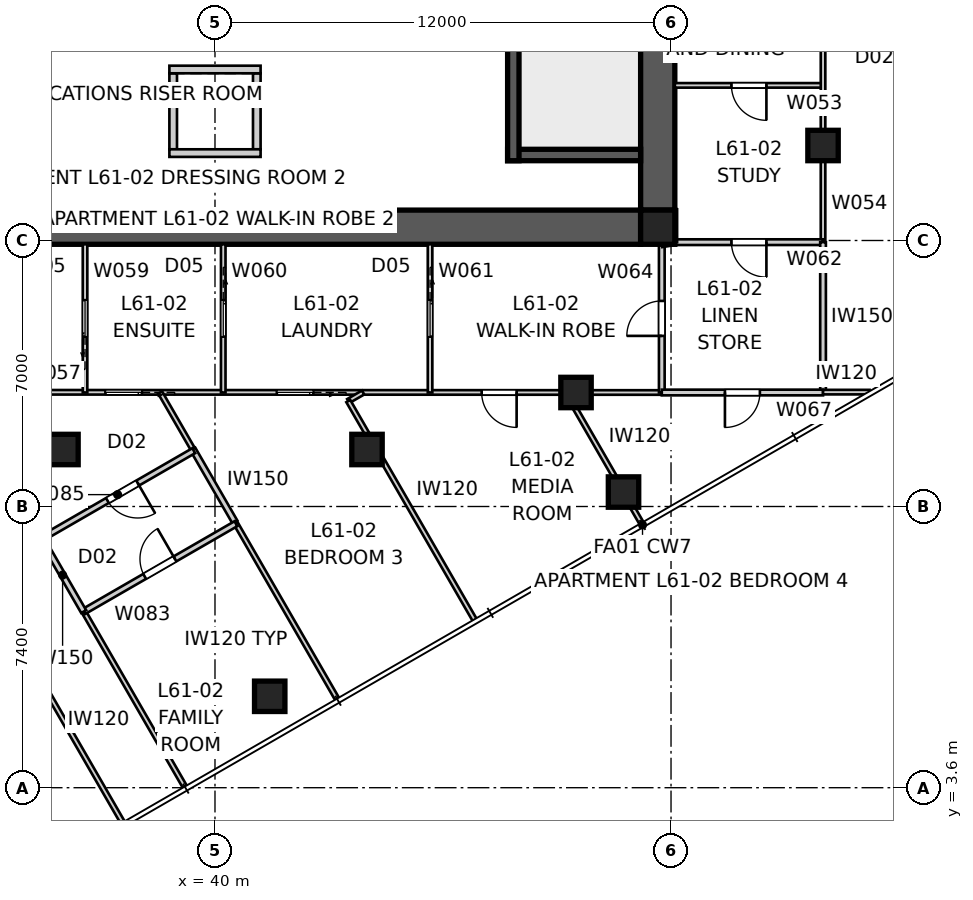
"""IFC4 building model, lengths in metres.
Left out: names, types, materials, properties, quantities, classifications, styles, units other than length and angle.
Written with IfcOpenShell. Run it as: python <this file> out.ifc"""

import sys

from ifc_helpers import new_model, si_unit, direction, frame, frame_2d, origin, origin_2d, place, context, subcontext, project, spatial, polyline, rectangle, outline, extrude, element, fill, save


model = new_model("IFC4")
c1 = context("Model", 3, precision=1e-05, world=origin(), true_north=direction((0.0, 1.0)))
c2 = subcontext(c1, "Body", "Model", "MODEL_VIEW")
j1 = project(units=[si_unit("LENGTHUNIT", "METRE"), si_unit("PLANEANGLEUNIT", "RADIAN")], contexts=[c1])
p1 = place(None, origin())
s1 = spatial("IfcSite", under=j1, at=p1, CompositionType="ELEMENT")
p2 = place(p1, origin())
s2 = spatial("IfcBuilding", under=s1, at=p2, CompositionType="ELEMENT")
p3 = place(p2, frame((0.0, 0.0, 221.8)))
s3 = spatial("IfcBuildingStorey", under=s2, at=p3, CompositionType="ELEMENT", Elevation=221.8)
p4 = place(p3, frame((51.2, 18.35, 0.0), z_axis=(0.0, 0.0, 1.0), x_axis=(-1.0, 0.0, 0.0)))
e1 = element("IfcWall", 1, at=p4, inside=s3, PredefinedType="SHEAR", context=c2, shape_type="SweptSolid", body=[
    extrude(outline(polyline([(0.0, -0.45), (22.4, -0.45), (22.4, -0.025), (22.85, -0.025), (22.85, 0.025), (22.4, 0.025), (22.4, 0.45), (0.0, 0.45), (0.0, 0.025), (-0.45, 0.025), (-0.45, -0.025), (0.0, -0.025), (0.0, -0.45)])), origin(), (0.0, 0.0, 1.0), 3.4),
])
p5 = place(p3, frame((51.65, 18.8, 0.0), z_axis=(0.0, 0.0, 1.0), x_axis=(0.0, 1.0, 0.0)))
e2 = element("IfcWall", 2, at=p5, inside=s3, PredefinedType="SHEAR", context=c2, shape_type="SweptSolid", body=[
    extrude(outline(polyline([(0.0, -0.45), (22.4, -0.45), (22.4, -0.025), (22.85, -0.025), (22.85, 0.025), (22.4, 0.025), (22.4, 0.45), (0.0, 0.45), (0.0, 0.025), (-0.45, 0.025), (-0.45, -0.025), (0.0, -0.025), (0.0, -0.45)])), origin(), (0.0, 0.0, 1.0), 3.4),
])
p6 = place(p5, frame((11.14, 0.0, 0.0)))
e3 = element("IfcOpeningElement", 3, at=p6, cuts=e2, PredefinedType="OPENING", context=c2, shape_type="SweptSolid", body=[
    extrude(rectangle(XDim=1.02, YDim=2.4, at=frame_2d((0.51, 1.2))), frame((0.0, 0.46, 0.0), z_axis=(0.0, -1.0, 0.0), x_axis=(1.0, 0.0, 0.0)), (0.0, 0.0, 1.0), 0.92),
])
p7 = place(p3, frame((47.85, 27.8, 0.0), z_axis=(0.0, 0.0, 1.0), x_axis=(0.0, -1.0, 0.0)))
e4 = element("IfcWall", 4, at=p7, inside=s3, PredefinedType="SHEAR", context=c2, shape_type="SweptSolid", body=[
    extrude(rectangle(XDim=7.7, YDim=0.3, at=frame_2d((3.85, 0.0))), origin(), (0.0, 0.0, 1.0), 3.4),
])
p8 = place(p3, frame((51.2, 20.25, 0.0), z_axis=(0.0, 0.0, 1.0), x_axis=(-1.0, 0.0, 0.0)))
e5 = element("IfcWall", 5, at=p8, inside=s3, PredefinedType="SHEAR", context=c2, shape_type="SweptSolid", body=[
    extrude(rectangle(XDim=3.5, YDim=0.3, at=frame_2d((1.75, 0.0))), origin(), (0.0, 0.0, 1.0), 3.4),
])
for number, where, z_axis, x_axis in (
    (6, (38.9, 22.4, 0.0), (0.0, 0.0, 1.0), (0.0, -1.0, 0.0)),
    (7, (41.1, 22.4, 0.0), (0.0, 0.0, 1.0), (0.0, -1.0, 0.0)),
):
    element("IfcWall", number, at=place(p3, frame(where, z_axis=z_axis, x_axis=x_axis)), inside=s3, PredefinedType="SOLIDWALL", context=c2, shape_type="SweptSolid", body=[
        extrude(rectangle(XDim=2.0, YDim=0.2, at=frame_2d((1.0, 0.0))), origin(), (0.0, 0.0, 1.0), 3.4),
    ])
for number, where, z_axis, x_axis in (
    (8, (38.8, 22.5, 0.0), (0.0, 0.0, 1.0), (1.0, 0.0, 0.0)),
    (9, (38.8, 20.3, 0.0), (0.0, 0.0, 1.0), (1.0, 0.0, 0.0)),
):
    element("IfcWall", number, at=place(p3, frame(where, z_axis=z_axis, x_axis=x_axis)), inside=s3, PredefinedType="SOLIDWALL", context=c2, shape_type="SweptSolid", body=[
        extrude(rectangle(XDim=2.4, YDim=0.2, at=frame_2d((1.2, 0.0))), origin(), (0.0, 0.0, 1.0), 3.4),
    ])
p9 = place(p3, frame((51.65, 18.35, 0.0), z_axis=(0.0, 0.0, 1.0), x_axis=(1.0, 0.0, 0.0)))
e10 = element("IfcColumn", 10, at=p9, inside=s3, PredefinedType="COLUMN", context=c2, shape_type="SweptSolid", body=[
    extrude(rectangle(XDim=0.9, YDim=0.9, at=origin_2d()), origin(), (0.0, 0.0, 1.0), 3.4),
])
for number, where, z_axis, x_axis in (
    (11, (41.44, 6.005, 0.0), (0.0, 0.0, 1.0), (1.0, 0.0, 0.0)),
    (12, (50.75, 11.38, 0.0), (0.0, 0.0, 1.0), (1.0, 0.0, 0.0)),
    (13, (36.0, 12.5, 0.0), (0.0, 0.0, 1.0), (1.0, 0.0, 0.0)),
    (14, (44.0, 12.5, 0.0), (0.0, 0.0, 1.0), (1.0, 0.0, 0.0)),
    (15, (49.5, 14.0, 0.0), (0.0, 0.0, 1.0), (1.0, 0.0, 0.0)),
    (16, (56.0, 20.5, 0.0), (0.0, 0.0, 1.0), (1.0, 0.0, 0.0)),
):
    element("IfcColumn", number, at=place(p3, frame(where, z_axis=z_axis, x_axis=x_axis)), inside=s3, PredefinedType="COLUMN", context=c2, shape_type="SweptSolid", body=[
        extrude(rectangle(XDim=0.8, YDim=0.8, at=origin_2d()), origin(), (0.0, 0.0, 1.0), 3.4),
    ])
p10 = place(p3, frame((56.0, 22.083, 0.0), z_axis=(0.0, 0.0, 1.0), x_axis=(-1.0, 0.0, 0.0)))
e17 = element("IfcWall", 17, at=p10, inside=s3, PredefinedType="PARTITIONING", context=c2, shape_type="SweptSolid", body=[
    extrude(rectangle(XDim=3.9, YDim=0.12, at=frame_2d((1.95, 0.0))), origin(), (0.0, 0.0, 1.0), 3.25),
])
p11 = place(p10, frame((1.49, 0.0, 0.0)))
e18 = element("IfcOpeningElement", 18, at=p11, cuts=e17, PredefinedType="OPENING", context=c2, shape_type="SweptSolid", body=[
    extrude(rectangle(XDim=0.92, YDim=2.34, at=frame_2d((0.46, 1.17))), frame((0.0, 0.07, 0.0), z_axis=(0.0, -1.0, 0.0), x_axis=(1.0, 0.0, 0.0)), (0.0, 0.0, 1.0), 0.14),
])
p12 = place(p3, frame((56.0, 28.557, 0.0), z_axis=(0.0, 0.0, 1.0), x_axis=(0.0, -1.0, 0.0)))
e19 = element("IfcWall", 19, at=p12, inside=s3, PredefinedType="PARTITIONING", context=c2, shape_type="SweptSolid", body=[
    extrude(rectangle(XDim=10.601, YDim=0.12, at=frame_2d((5.3, 0.0))), origin(), (0.0, 0.0, 1.0), 2.55),
])
p13 = place(p12, frame((2.989, 0.0, 0.0)))
e20 = element("IfcOpeningElement", 20, at=p13, cuts=e19, PredefinedType="OPENING", context=c2, shape_type="SweptSolid", body=[
    extrude(rectangle(XDim=0.92, YDim=2.34, at=frame_2d((0.46, 1.17))), frame((0.0, 0.07, 0.0), z_axis=(0.0, -1.0, 0.0), x_axis=(1.0, 0.0, 0.0)), (0.0, 0.0, 1.0), 0.14),
])
p14 = place(p3, frame((51.757, 14.0, 0.0), z_axis=(0.0, 0.0, 1.0), x_axis=(-0.999999938148, 0.000351716958, 0.0)))
e21 = element("IfcWall", 21, at=p14, inside=s3, PredefinedType="PARTITIONING", context=c2, shape_type="SweptSolid", body=[
    extrude(rectangle(XDim=28.46, YDim=0.12, at=frame_2d((14.23, 0.0))), origin(), (0.0, 0.0, 1.0), 2.55),
])
p15 = place(p14, frame((3.82, 0.0, 0.0)))
e22 = element("IfcOpeningElement", 22, at=p15, cuts=e21, PredefinedType="OPENING", context=c2, shape_type="SweptSolid", body=[
    extrude(rectangle(XDim=0.92, YDim=2.34, at=frame_2d((0.46, 1.17))), frame((0.0, 0.07, 0.0), z_axis=(0.0, -1.0, 0.0), x_axis=(1.0, 0.0, 0.0)), (0.0, 0.0, 1.0), 0.14),
])
p16 = place(p14, frame((9.17, 0.0, 0.0)))
e23 = element("IfcOpeningElement", 23, at=p16, cuts=e21, PredefinedType="OPENING", context=c2, shape_type="SweptSolid", body=[
    extrude(rectangle(XDim=0.96, YDim=2.1, at=frame_2d((0.48, 1.05))), frame((0.0, 0.07, 0.0), z_axis=(0.0, -1.0, 0.0), x_axis=(1.0, 0.0, 0.0)), (0.0, 0.0, 1.0), 0.14),
])
p17 = place(p14, frame((13.68, 0.0, 0.0)))
e24 = element("IfcOpeningElement", 24, at=p17, cuts=e21, PredefinedType="OPENING", context=c2, shape_type="SweptSolid", body=[
    extrude(rectangle(XDim=0.96, YDim=2.1, at=frame_2d((0.48, 1.05))), frame((0.0, 0.07, 0.0), z_axis=(0.0, -1.0, 0.0), x_axis=(1.0, 0.0, 0.0)), (0.0, 0.0, 1.0), 0.14),
])
p18 = place(p14, frame((23.854, 0.0, 0.0)))
e25 = element("IfcOpeningElement", 25, at=p18, cuts=e21, PredefinedType="OPENING", context=c2, shape_type="SweptSolid", body=[
    extrude(rectangle(XDim=0.92, YDim=2.34, at=frame_2d((0.46, 1.17))), frame((0.0, 0.07, 0.0), z_axis=(0.0, -1.0, 0.0), x_axis=(1.0, 0.0, 0.0)), (0.0, 0.0, 1.0), 0.14),
])
p19 = place(p3, frame((36.581, 14.0, 0.0), z_axis=(0.0, 0.0, 1.0), x_axis=(0.0, 1.0, 0.0)))
e26 = element("IfcWall", 26, at=p19, inside=s3, PredefinedType="PARTITIONING", context=c2, shape_type="SweptSolid", body=[
    extrude(rectangle(XDim=3.9, YDim=0.12, at=frame_2d((1.95, 0.0))), origin(), (0.0, 0.0, 1.0), 3.25),
])
p20 = place(p19, frame((1.47, 0.0, 0.0)))
e27 = element("IfcOpeningElement", 27, at=p20, cuts=e26, PredefinedType="OPENING", context=c2, shape_type="SweptSolid", body=[
    extrude(rectangle(XDim=0.96, YDim=2.1, at=frame_2d((0.48, 1.05))), frame((0.0, 0.07, 0.0), z_axis=(0.0, -1.0, 0.0), x_axis=(1.0, 0.0, 0.0)), (0.0, 0.0, 1.0), 0.14),
])
p21 = place(p3, frame((40.217, 17.9, 0.0), z_axis=(0.0, 0.0, 1.0), x_axis=(0.0, -1.0, 0.0)))
e28 = element("IfcWall", 28, at=p21, inside=s3, PredefinedType="PARTITIONING", context=c2, shape_type="SweptSolid", body=[
    extrude(rectangle(XDim=3.9, YDim=0.12, at=frame_2d((1.95, 0.0))), origin(), (0.0, 0.0, 1.0), 3.25),
])
p22 = place(p21, frame((1.47, 0.0, 0.0)))
e29 = element("IfcOpeningElement", 29, at=p22, cuts=e28, PredefinedType="OPENING", context=c2, shape_type="SweptSolid", body=[
    extrude(rectangle(XDim=0.96, YDim=2.1, at=frame_2d((0.48, 1.05))), frame((0.0, 0.07, 0.0), z_axis=(0.0, -1.0, 0.0), x_axis=(1.0, 0.0, 0.0)), (0.0, 0.0, 1.0), 0.14),
])
p23 = place(p3, frame((45.659, 17.9, 0.0), z_axis=(0.0, 0.0, 1.0), x_axis=(0.0, -1.0, 0.0)))
e30 = element("IfcWall", 30, at=p23, inside=s3, PredefinedType="PARTITIONING", context=c2, shape_type="SweptSolid", body=[
    extrude(rectangle(XDim=3.9, YDim=0.12, at=frame_2d((1.95, 0.0))), origin(), (0.0, 0.0, 1.0), 3.25),
])
p24 = place(p23, frame((1.47, 0.0, 0.0)))
e31 = element("IfcOpeningElement", 31, at=p24, cuts=e30, PredefinedType="OPENING", context=c2, shape_type="SweptSolid", body=[
    extrude(rectangle(XDim=0.96, YDim=2.1, at=frame_2d((0.48, 1.05))), frame((0.0, 0.07, 0.0), z_axis=(0.0, -1.0, 0.0), x_axis=(1.0, 0.0, 0.0)), (0.0, 0.0, 1.0), 0.14),
])
p25 = place(p3, frame((56.0, 17.956, 0.0), z_axis=(0.0, 0.0, 1.0), x_axis=(-1.0, 0.0, 0.0)))
e32 = element("IfcWall", 32, at=p25, inside=s3, PredefinedType="SOLIDWALL", context=c2, shape_type="SweptSolid", body=[
    extrude(rectangle(XDim=3.9, YDim=0.15, at=frame_2d((1.95, 0.0))), origin(), (0.0, 0.0, 1.0), 3.25),
])
p26 = place(p25, frame((1.49, 0.0, 0.0)))
e33 = element("IfcOpeningElement", 33, at=p26, cuts=e32, PredefinedType="OPENING", context=c2, shape_type="SweptSolid", body=[
    extrude(rectangle(XDim=0.92, YDim=2.1, at=frame_2d((0.46, 1.05))), frame((0.0, 0.085, 0.0), z_axis=(0.0, -1.0, 0.0), x_axis=(1.0, 0.0, 0.0)), (0.0, 0.0, 1.0), 0.17),
])
p27 = place(p3, frame((52.1, 17.956, 0.0), z_axis=(0.0, 0.0, 1.0), x_axis=(0.0, 1.0, 0.0)))
e34 = element("IfcWall", 34, at=p27, inside=s3, PredefinedType="PARTITIONING", context=c2, shape_type="SweptSolid", body=[
    extrude(rectangle(XDim=0.864, YDim=0.12, at=frame_2d((0.432, 0.0))), origin(), (0.0, 0.0, 1.0), 3.25),
])
p28 = place(p3, frame((51.757, 14.0, 0.0), z_axis=(0.0, 0.0, 1.0), x_axis=(0.0, 1.0, 0.0)))
e35 = element("IfcWall", 35, at=p28, inside=s3, PredefinedType="SOLIDWALL", context=c2, shape_type="SweptSolid", body=[
    extrude(rectangle(XDim=3.9, YDim=0.15, at=frame_2d((1.95, 0.0))), origin(), (0.0, 0.0, 1.0), 3.25),
])
p29 = place(p28, frame((1.49, 0.0, 0.0)))
e36 = element("IfcOpeningElement", 36, at=p29, cuts=e35, PredefinedType="OPENING", context=c2, shape_type="SweptSolid", body=[
    extrude(rectangle(XDim=0.92, YDim=2.1, at=frame_2d((0.46, 1.05))), frame((0.0, 0.085, 0.0), z_axis=(0.0, -1.0, 0.0), x_axis=(1.0, 0.0, 0.0)), (0.0, 0.0, 1.0), 0.17),
])
p30 = place(p3, frame((56.0, 17.956, 0.0), z_axis=(0.0, 0.0, 1.0), x_axis=(0.0, -1.0, 0.0)))
e37 = element("IfcWall", 37, at=p30, inside=s3, PredefinedType="SOLIDWALL", context=c2, shape_type="SweptSolid", body=[
    extrude(rectangle(XDim=3.956, YDim=0.15, at=frame_2d((1.978, 0.0))), origin(), (0.0, 0.0, 1.0), 3.25),
])
p31 = place(p3, frame((56.0, 14.0, 0.0), z_axis=(0.0, 0.0, 1.0), x_axis=(-1.0, 0.0, 0.0)))
e38 = element("IfcWall", 38, at=p31, inside=s3, PredefinedType="SOLIDWALL", context=c2, shape_type="SweptSolid", body=[
    extrude(rectangle(XDim=4.243, YDim=0.15, at=frame_2d((2.122, 0.0))), origin(), (0.0, 0.0, 1.0), 3.25),
])
p32 = place(p31, frame((1.661, 0.0, 0.0)))
e39 = element("IfcOpeningElement", 39, at=p32, cuts=e38, PredefinedType="OPENING", context=c2, shape_type="SweptSolid", body=[
    extrude(rectangle(XDim=0.92, YDim=2.34, at=frame_2d((0.46, 1.17))), frame((0.0, 0.085, 0.0), z_axis=(0.0, -1.0, 0.0), x_axis=(1.0, 0.0, 0.0)), (0.0, 0.0, 1.0), 0.17),
])
p33 = place(p3, frame((31.039, 14.0, 0.0), z_axis=(0.0, 0.0, 1.0), x_axis=(0.500006184843, -0.866021832934, 0.0)))
e40 = element("IfcWall", 40, at=p33, inside=s3, PredefinedType="PARTITIONING", context=c2, shape_type="SweptSolid", body=[
    extrude(rectangle(XDim=13.084, YDim=0.12, at=frame_2d((6.542, 0.0))), origin(), (0.0, 0.0, 1.0), 3.25),
])
p34 = place(p33, frame((6.102, 0.0, 0.0)))
e41 = element("IfcOpeningElement", 41, at=p34, cuts=e40, PredefinedType="OPENING", context=c2, shape_type="SweptSolid", body=[
    extrude(rectangle(XDim=0.92, YDim=2.34, at=frame_2d((0.46, 1.17))), frame((0.0, 0.07, 0.0), z_axis=(0.0, -1.0, 0.0), x_axis=(1.0, 0.0, 0.0)), (0.0, 0.0, 1.0), 0.14),
])
p35 = place(p3, frame((57.225, 14.01, 0.0), z_axis=(0.0, 0.0, 1.0), x_axis=(-1.0, 0.0, 0.0)))
e42 = element("IfcWall", 42, at=p35, inside=s3, PredefinedType="PARTITIONING", context=c2, shape_type="SweptSolid", body=[
    extrude(rectangle(XDim=1.225, YDim=0.12, at=frame_2d((0.612, 0.0))), origin(), (0.0, 0.0, 1.0), 3.25),
])
p36 = place(p3, frame((43.219, 5.924, 0.0), z_axis=(0.0, 0.0, 1.0), x_axis=(-0.500003544594, 0.866023357302, 0.0)))
e43 = element("IfcWall", 43, at=p36, inside=s3, PredefinedType="PARTITIONING", context=c2, shape_type="SweptSolid", body=[
    extrude(rectangle(XDim=5.388, YDim=0.12, at=frame_2d((2.694, 0.0))), origin(), (0.0, 0.0, 1.0), 3.25),
])
p37 = place(p3, frame((43.897, 14.0, 0.0), z_axis=(0.0, 0.0, 1.0), x_axis=(-0.865896406789, -0.500223362819, 0.0)))
e44 = element("IfcWall", 44, at=p37, inside=s3, PredefinedType="PARTITIONING", context=c2, shape_type="SweptSolid", body=[
    extrude(rectangle(XDim=0.45, YDim=0.12, at=frame_2d((0.225, 0.0))), origin(), (0.0, 0.0, 1.0), 3.25),
])
p38 = place(p3, frame((43.507, 13.775, 0.0), z_axis=(0.0, 0.0, 1.0), x_axis=(0.500013541994, -0.866017585169, 0.0)))
e45 = element("IfcWall", 45, at=p38, inside=s3, PredefinedType="PARTITIONING", context=c2, shape_type="SweptSolid", body=[
    extrude(rectangle(XDim=6.655, YDim=0.12, at=frame_2d((3.328, 0.0))), origin(), (0.0, 0.0, 1.0), 3.25),
])
p39 = place(p3, frame((39.416, 12.512, 0.0), z_axis=(0.0, 0.0, 1.0), x_axis=(-0.500005339912, 0.866022320763, 0.0)))
e46 = element("IfcWall", 46, at=p39, inside=s3, PredefinedType="PARTITIONING", context=c2, shape_type="SweptSolid", body=[
    extrude(rectangle(XDim=1.718, YDim=0.12, at=frame_2d((0.859, 0.0))), origin(), (0.0, 0.0, 1.0), 3.25),
])
p40 = place(p3, frame((40.525, 10.59, 0.0), z_axis=(0.0, 0.0, 1.0), x_axis=(-0.499973265211, 0.866040838572, 0.0)))
e47 = element("IfcWall", 47, at=p40, inside=s3, PredefinedType="SOLIDWALL", context=c2, shape_type="SweptSolid", body=[
    extrude(rectangle(XDim=2.219, YDim=0.15, at=frame_2d((1.109, 0.0))), origin(), (0.0, 0.0, 1.0), 3.25),
])
p41 = place(p3, frame((51.23, 10.549, 0.0), z_axis=(0.0, 0.0, 1.0), x_axis=(-0.500007073895, 0.866021319631, 0.0)))
e48 = element("IfcWall", 48, at=p41, inside=s3, PredefinedType="PARTITIONING", context=c2, shape_type="SweptSolid", body=[
    extrude(rectangle(XDim=3.985, YDim=0.12, at=frame_2d((1.992, 0.0))), origin(), (0.0, 0.0, 1.0), 3.25),
])
p42 = place(p3, frame((39.214, 3.612, 0.0), z_axis=(0.0, 0.0, 1.0), x_axis=(-0.499995631649, 0.866027925839, 0.0)))
e49 = element("IfcWall", 49, at=p42, inside=s3, PredefinedType="PARTITIONING", context=c2, shape_type="SweptSolid", body=[
    extrude(rectangle(XDim=5.338, YDim=0.12, at=frame_2d((2.669, 0.0))), origin(), (0.0, 0.0, 1.0), 3.25),
])
p43 = place(p3, frame((36.545, 8.234, 0.0), z_axis=(0.0, 0.0, 1.0), x_axis=(0.866025598446, 0.499999662836, 0.0)))
e50 = element("IfcWall", 50, at=p43, inside=s3, PredefinedType="SOLIDWALL", context=c2, shape_type="SweptSolid", body=[
    extrude(rectangle(XDim=4.625, YDim=0.15, at=frame_2d((2.312, 0.0))), origin(), (0.0, 0.0, 1.0), 3.25),
])
p44 = place(p43, frame((1.853, 0.0, 0.0)))
e51 = element("IfcOpeningElement", 51, at=p44, cuts=e50, PredefinedType="OPENING", context=c2, shape_type="SweptSolid", body=[
    extrude(rectangle(XDim=0.92, YDim=2.34, at=frame_2d((0.46, 1.17))), frame((0.0, 0.085, 0.0), z_axis=(0.0, -1.0, 0.0), x_axis=(1.0, 0.0, 0.0)), (0.0, 0.0, 1.0), 0.17),
])
p45 = place(p3, frame((39.441, 12.469, 0.0), z_axis=(0.0, 0.0, 1.0), x_axis=(-0.866025598446, -0.499999662836, 0.0)))
e52 = element("IfcWall", 52, at=p45, inside=s3, PredefinedType="SOLIDWALL", context=c2, shape_type="SweptSolid", body=[
    extrude(rectangle(XDim=4.625, YDim=0.15, at=frame_2d((2.312, 0.0))), origin(), (0.0, 0.0, 1.0), 3.25),
])
p46 = place(p45, frame((1.702, 0.0, 0.0)))
e53 = element("IfcOpeningElement", 53, at=p46, cuts=e52, PredefinedType="OPENING", context=c2, shape_type="SweptSolid", body=[
    extrude(rectangle(XDim=0.92, YDim=2.34, at=frame_2d((0.46, 1.17))), frame((0.0, 0.085, 0.0), z_axis=(0.0, -1.0, 0.0), x_axis=(1.0, 0.0, 0.0)), (0.0, 0.0, 1.0), 0.17),
])
p47 = place(p3, frame((35.435, 10.156, 0.0), z_axis=(0.0, 0.0, 1.0), x_axis=(0.500008142102, -0.866020702889, 0.0)))
e54 = element("IfcWall", 54, at=p47, inside=s3, PredefinedType="SOLIDWALL", context=c2, shape_type="SweptSolid", body=[
    extrude(rectangle(XDim=2.219, YDim=0.15, at=frame_2d((1.11, 0.0))), origin(), (0.0, 0.0, 1.0), 3.25),
])
p48 = place(p3, frame((51.757, 17.9, 0.0), z_axis=(0.0, 0.0, 1.0), x_axis=(0.986864404584, 0.161550756622, 0.0)))
e55 = element("IfcWall", 55, at=p48, inside=s3, PredefinedType="SOLIDWALL", context=c2, shape_type="SweptSolid", body=[
    extrude(rectangle(XDim=0.348, YDim=0.15, at=frame_2d((0.174, 0.0))), origin(), (0.0, 0.0, 1.0), 3.25),
])
p49 = place(p11, origin())
e56 = element("IfcDoor", 56, at=p49, inside=s3, OperationType="SINGLE_SWING_LEFT", PredefinedType="DOOR", context=c2, shape_type="SweptSolid", body=[
    extrude(rectangle(XDim=0.92, YDim=2.34, at=frame_2d((0.46, 1.17))), frame((0.0, 0.025, 0.0), z_axis=(0.0, -1.0, 0.0), x_axis=(1.0, 0.0, 0.0)), (0.0, 0.0, 1.0), 0.05),
])
fill(e18, e56)
p50 = place(p26, origin())
e57 = element("IfcDoor", 57, at=p50, inside=s3, OperationType="SINGLE_SWING_LEFT", PredefinedType="DOOR", context=c2, shape_type="SweptSolid", body=[
    extrude(rectangle(XDim=0.92, YDim=2.1, at=frame_2d((0.46, 1.05))), frame((0.0, 0.025, 0.0), z_axis=(0.0, -1.0, 0.0), x_axis=(1.0, 0.0, 0.0)), (0.0, 0.0, 1.0), 0.05),
])
fill(e33, e57)
p51 = place(p32, origin())
e58 = element("IfcDoor", 58, at=p51, inside=s3, OperationType="SINGLE_SWING_RIGHT", PredefinedType="DOOR", context=c2, shape_type="SweptSolid", body=[
    extrude(rectangle(XDim=0.92, YDim=2.34, at=frame_2d((0.46, 1.17))), frame((0.0, 0.025, 0.0), z_axis=(0.0, -1.0, 0.0), x_axis=(1.0, 0.0, 0.0)), (0.0, 0.0, 1.0), 0.05),
])
fill(e39, e58)
p52 = place(p29, origin())
e59 = element("IfcDoor", 59, at=p52, inside=s3, OperationType="SINGLE_SWING_LEFT", PredefinedType="DOOR", context=c2, shape_type="SweptSolid", body=[
    extrude(rectangle(XDim=0.92, YDim=2.1, at=frame_2d((0.46, 1.05))), frame((0.0, 0.025, 0.0), z_axis=(0.0, -1.0, 0.0), x_axis=(1.0, 0.0, 0.0)), (0.0, 0.0, 1.0), 0.05),
])
fill(e36, e59)
p53 = place(p24, origin())
e60 = element("IfcDoor", 60, at=p53, inside=s3, OperationType="SLIDING_TO_LEFT", PredefinedType="DOOR", context=c2, shape_type="SweptSolid", body=[
    extrude(rectangle(XDim=0.96, YDim=2.1, at=frame_2d((0.48, 1.05))), frame((0.0, 0.025, 0.0), z_axis=(0.0, -1.0, 0.0), x_axis=(1.0, 0.0, 0.0)), (0.0, 0.0, 1.0), 0.05),
])
fill(e31, e60)
p54 = place(p15, origin())
e61 = element("IfcDoor", 61, at=p54, inside=s3, OperationType="SINGLE_SWING_LEFT", PredefinedType="DOOR", context=c2, shape_type="SweptSolid", body=[
    extrude(rectangle(XDim=0.92, YDim=2.34, at=frame_2d((0.46, 1.17))), frame((0.0, 0.025, 0.0), z_axis=(0.0, -1.0, 0.0), x_axis=(1.0, 0.0, 0.0)), (0.0, 0.0, 1.0), 0.05),
])
fill(e22, e61)
p55 = place(p22, origin())
e62 = element("IfcDoor", 62, at=p55, inside=s3, OperationType="SLIDING_TO_LEFT", PredefinedType="DOOR", context=c2, shape_type="SweptSolid", body=[
    extrude(rectangle(XDim=0.96, YDim=2.1, at=frame_2d((0.48, 1.05))), frame((0.0, 0.025, 0.0), z_axis=(0.0, -1.0, 0.0), x_axis=(1.0, 0.0, 0.0)), (0.0, 0.0, 1.0), 0.05),
])
fill(e29, e62)
p56 = place(p16, origin())
e63 = element("IfcDoor", 63, at=p56, inside=s3, OperationType="SLIDING_TO_LEFT", PredefinedType="DOOR", context=c2, shape_type="SweptSolid", body=[
    extrude(rectangle(XDim=0.96, YDim=2.1, at=frame_2d((0.48, 1.05))), frame((0.0, 0.025, 0.0), z_axis=(0.0, -1.0, 0.0), x_axis=(1.0, 0.0, 0.0)), (0.0, 0.0, 1.0), 0.05),
])
fill(e23, e63)
p57 = place(p20, origin())
e64 = element("IfcDoor", 64, at=p57, inside=s3, OperationType="SLIDING_TO_LEFT", PredefinedType="DOOR", context=c2, shape_type="SweptSolid", body=[
    extrude(rectangle(XDim=0.96, YDim=2.1, at=frame_2d((0.48, 1.05))), frame((0.0, 0.025, 0.0), z_axis=(0.0, -1.0, 0.0), x_axis=(1.0, 0.0, 0.0)), (0.0, 0.0, 1.0), 0.05),
])
fill(e27, e64)
p58 = place(p17, origin())
e65 = element("IfcDoor", 65, at=p58, inside=s3, OperationType="SLIDING_TO_LEFT", PredefinedType="DOOR", context=c2, shape_type="SweptSolid", body=[
    extrude(rectangle(XDim=0.96, YDim=2.1, at=frame_2d((0.48, 1.05))), frame((0.0, 0.025, 0.0), z_axis=(0.0, -1.0, 0.0), x_axis=(1.0, 0.0, 0.0)), (0.0, 0.0, 1.0), 0.05),
])
fill(e24, e65)
p59 = place(p46, origin())
e66 = element("IfcDoor", 66, at=p59, inside=s3, OperationType="SINGLE_SWING_LEFT", PredefinedType="DOOR", context=c2, shape_type="SweptSolid", body=[
    extrude(rectangle(XDim=0.92, YDim=2.34, at=frame_2d((0.46, 1.17))), frame((0.0, 0.025, 0.0), z_axis=(0.0, -1.0, 0.0), x_axis=(1.0, 0.0, 0.0)), (0.0, 0.0, 1.0), 0.05),
])
fill(e53, e66)
p60 = place(p44, origin())
e67 = element("IfcDoor", 67, at=p60, inside=s3, OperationType="SINGLE_SWING_RIGHT", PredefinedType="DOOR", context=c2, shape_type="SweptSolid", body=[
    extrude(rectangle(XDim=0.92, YDim=2.34, at=frame_2d((0.46, 1.17))), frame((0.0, 0.025, 0.0), z_axis=(0.0, -1.0, 0.0), x_axis=(1.0, 0.0, 0.0)), (0.0, 0.0, 1.0), 0.05),
])
fill(e51, e67)
save(model, sys.argv[1])
